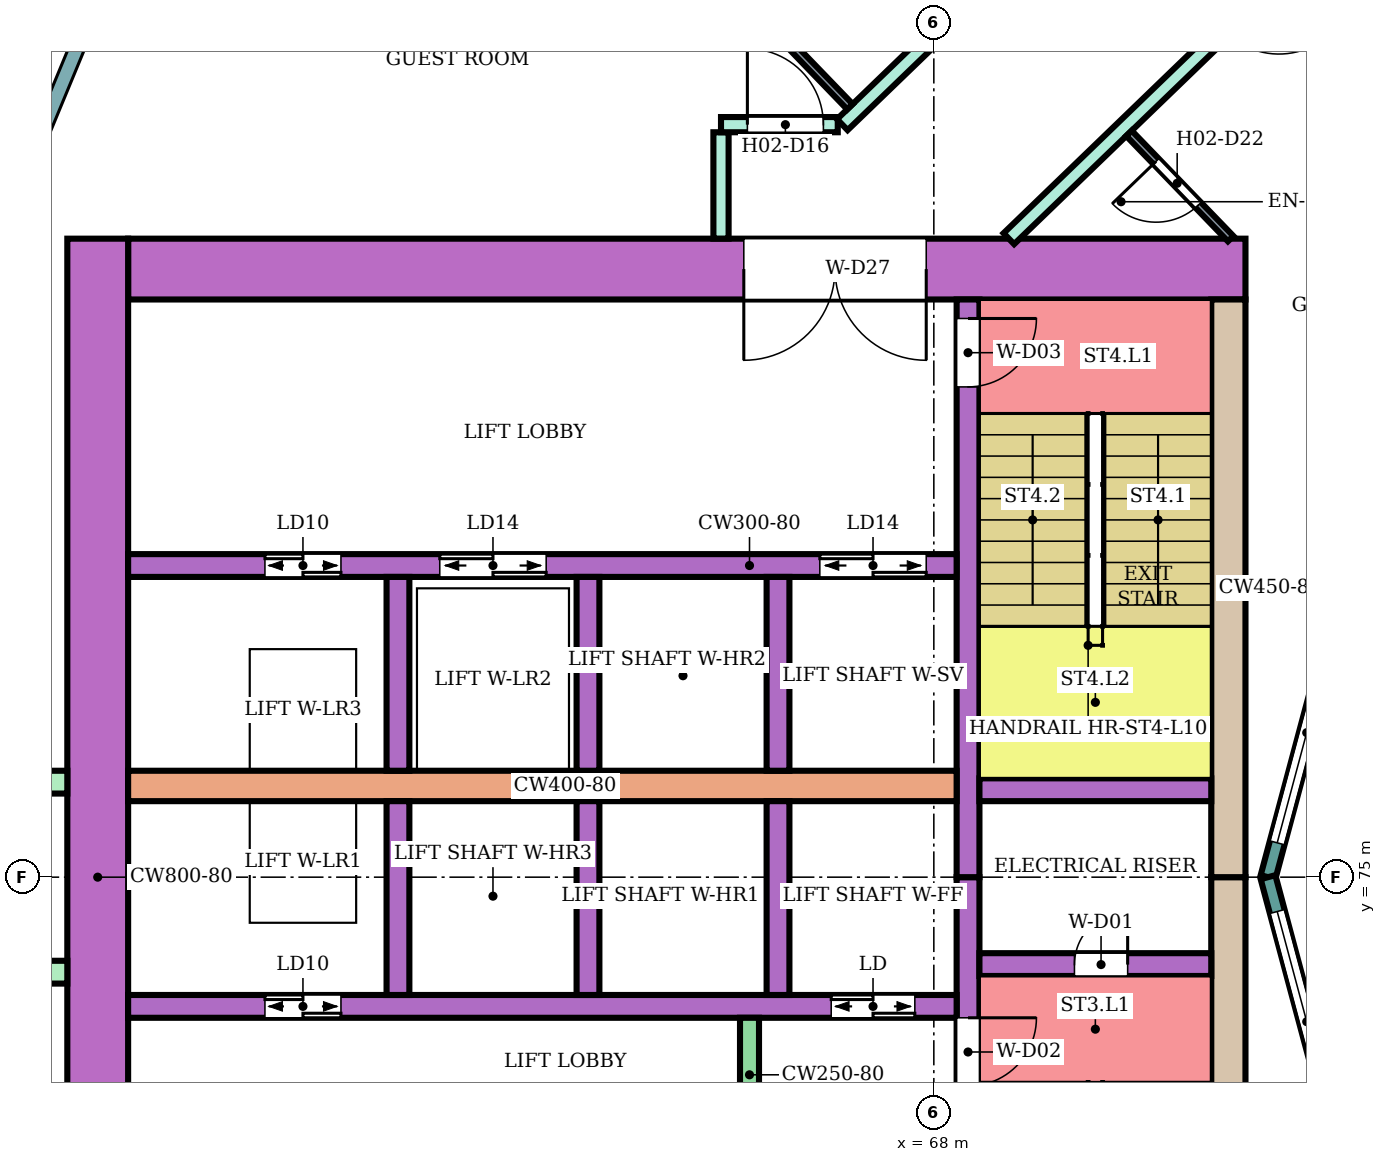
"""IFC4 building model, lengths in metres.
Left out: names, types, materials, properties, quantities, classifications, styles, units other than length and angle.
Written with IfcOpenShell. Run it as: python <this file> out.ifc"""

import sys

from ifc_helpers import new_model, si_unit, direction, frame, frame_2d, origin, place, context, subcontext, project, spatial, rectangle, extrude, element, fill, save


model = new_model("IFC4")
c1 = context("Model", 3, precision=1e-05, world=origin(), true_north=direction((0.0, 1.0)))
c2 = subcontext(c1, "Body", "Model", "MODEL_VIEW")
j1 = project(units=[si_unit("LENGTHUNIT", "METRE"), si_unit("PLANEANGLEUNIT", "RADIAN")], contexts=[c1])
p1 = place(None, origin())
s1 = spatial("IfcSite", under=j1, at=p1, CompositionType="ELEMENT")
p2 = place(p1, origin())
s2 = spatial("IfcBuilding", under=s1, at=p2, CompositionType="ELEMENT")
p3 = place(p2, frame((0.0, 0.0, 47.8)))
s3 = spatial("IfcBuildingStorey", under=s2, at=p3, CompositionType="ELEMENT", Elevation=47.8)
p4 = place(p3, frame((72.1, 83.0, 0.0), z_axis=(0.0, 0.0, 1.0), x_axis=(-1.0, 0.0, 0.0)))
e1 = element("IfcWall", 1, at=p4, inside=s3, PredefinedType="SHEAR", context=c2, shape_type="SweptSolid", body=[
    extrude(rectangle(XDim=14.7, YDim=0.8, at=frame_2d((7.35, 0.0))), origin(), (0.0, 0.0, 1.0), 3.48),
])
p5 = place(p4, frame((4.2, 0.0, 0.0)))
e2 = element("IfcOpeningElement", 2, at=p5, cuts=e1, PredefinedType="OPENING", context=c2, shape_type="SweptSolid", body=[
    extrude(rectangle(XDim=2.4, YDim=2.4, at=frame_2d((1.2, 1.2))), frame((0.0, 0.41, 0.0), z_axis=(0.0, -1.0, 0.0), x_axis=(1.0, 0.0, 0.0)), (0.0, 0.0, 1.0), 0.82),
])
for number, where, z_axis, x_axis in (
    (3, (71.875, 75.0, 0.0), (0.0, 0.0, 1.0), (0.0, -1.0, 0.0)),
    (4, (71.875, 82.6, 0.0), (0.0, 0.0, 1.0), (0.0, -1.0, 0.0)),
):
    element("IfcWall", number, at=place(p3, frame(where, z_axis=z_axis, x_axis=x_axis)), inside=s3, PredefinedType="SHEAR", context=c2, shape_type="SweptSolid", body=[
        extrude(rectangle(XDim=7.6, YDim=0.45, at=frame_2d((3.8, 0.0))), origin(), (0.0, 0.0, 1.0), 3.48),
    ])
p6 = place(p3, frame((57.0, 83.4, 0.0), z_axis=(0.0, 0.0, 1.0), x_axis=(0.0, -1.0, 0.0)))
e5 = element("IfcWall", 5, at=p6, inside=s3, PredefinedType="SHEAR", context=c2, shape_type="SweptSolid", body=[
    extrude(rectangle(XDim=16.8, YDim=0.8, at=frame_2d((8.4, 0.0))), origin(), (0.0, 0.0, 1.0), 3.48),
])
p7 = place(p3, frame((68.45, 75.0, 0.0), z_axis=(0.0, 0.0, 1.0), x_axis=(0.0, -1.0, 0.0)))
e6 = element("IfcWall", 6, at=p7, inside=s3, PredefinedType="SHEAR", context=c2, shape_type="SweptSolid", body=[
    extrude(rectangle(XDim=7.6, YDim=0.3, at=frame_2d((3.8, 0.0))), origin(), (0.0, 0.0, 1.0), 3.48),
])
p8 = place(p7, frame((1.85, 0.0, 0.0)))
e7 = element("IfcOpeningElement", 7, at=p8, cuts=e6, PredefinedType="OPENING", context=c2, shape_type="SweptSolid", body=[
    extrude(rectangle(XDim=0.9, YDim=2.1, at=frame_2d((0.45, 1.05))), frame((0.0, 0.16, 0.0), z_axis=(0.0, -1.0, 0.0), x_axis=(1.0, 0.0, 0.0)), (0.0, 0.0, 1.0), 0.32),
])
p9 = place(p3, frame((68.45, 82.6, 0.0), z_axis=(0.0, 0.0, 1.0), x_axis=(0.0, -1.0, 0.0)))
e8 = element("IfcWall", 8, at=p9, inside=s3, PredefinedType="SHEAR", context=c2, shape_type="SweptSolid", body=[
    extrude(rectangle(XDim=7.6, YDim=0.3, at=frame_2d((3.8, 0.0))), origin(), (0.0, 0.0, 1.0), 3.48),
])
p10 = place(p9, frame((0.25, 0.0, 0.0)))
e9 = element("IfcOpeningElement", 9, at=p10, cuts=e8, PredefinedType="OPENING", context=c2, shape_type="SweptSolid", body=[
    extrude(rectangle(XDim=0.9, YDim=2.1, at=frame_2d((0.45, 1.05))), frame((0.0, 0.16, 0.0), z_axis=(0.0, -1.0, 0.0), x_axis=(1.0, 0.0, 0.0)), (0.0, 0.0, 1.0), 0.32),
])
p11 = place(p3, frame((71.65, 73.85, 0.0), z_axis=(0.0, 0.0, 1.0), x_axis=(-1.0, 0.0, 0.0)))
e10 = element("IfcWall", 10, at=p11, inside=s3, PredefinedType="SHEAR", context=c2, shape_type="SweptSolid", body=[
    extrude(rectangle(XDim=3.05, YDim=0.3, at=frame_2d((1.525, 0.0))), origin(), (0.0, 0.0, 1.0), 3.48),
])
p12 = place(p11, frame((1.1, 0.0, 0.0)))
e11 = element("IfcOpeningElement", 11, at=p12, cuts=e10, PredefinedType="OPENING", context=c2, shape_type="SweptSolid", body=[
    extrude(rectangle(XDim=0.7, YDim=2.0, at=frame_2d((0.35, 1.0))), frame((0.0, 0.16, 0.0), z_axis=(0.0, -1.0, 0.0), x_axis=(1.0, 0.0, 0.0)), (0.0, 0.0, 1.0), 0.32),
])
p13 = place(p3, frame((71.65, 76.15, 0.0), z_axis=(0.0, 0.0, 1.0), x_axis=(-1.0, 0.0, 0.0)))
e12 = element("IfcWall", 12, at=p13, inside=s3, PredefinedType="SHEAR", context=c2, shape_type="SweptSolid", body=[
    extrude(rectangle(XDim=3.05, YDim=0.3, at=frame_2d((1.525, 0.0))), origin(), (0.0, 0.0, 1.0), 3.48),
])
p14 = place(p3, frame((68.3, 73.3, 0.0), z_axis=(0.0, 0.0, 1.0), x_axis=(-1.0, 0.0, 0.0)))
e13 = element("IfcWall", 13, at=p14, inside=s3, PredefinedType="SHEAR", context=c2, shape_type="SweptSolid", body=[
    extrude(rectangle(XDim=10.9, YDim=0.3, at=frame_2d((5.45, 0.0))), origin(), (0.0, 0.0, 1.0), 3.48),
])
p15 = place(p14, frame((0.55, 0.0, 0.0)))
e14 = element("IfcOpeningElement", 14, at=p15, cuts=e13, PredefinedType="OPENING", context=c2, shape_type="SweptSolid", body=[
    extrude(rectangle(XDim=1.1, YDim=2.1, at=frame_2d((0.55, 1.05))), frame((0.0, 0.16, 0.0), z_axis=(0.0, -1.0, 0.0), x_axis=(1.0, 0.0, 0.0)), (0.0, 0.0, 1.0), 0.32),
])
p16 = place(p14, frame((8.1, 0.0, 0.0)))
e15 = element("IfcOpeningElement", 15, at=p16, cuts=e13, PredefinedType="OPENING", context=c2, shape_type="SweptSolid", body=[
    extrude(rectangle(XDim=1.0, YDim=2.1, at=frame_2d((0.5, 1.05))), frame((0.0, 0.16, 0.0), z_axis=(0.0, -1.0, 0.0), x_axis=(1.0, 0.0, 0.0)), (0.0, 0.0, 1.0), 0.32),
])
p17 = place(p3, frame((68.3, 76.2, 0.0), z_axis=(0.0, 0.0, 1.0), x_axis=(-1.0, 0.0, 0.0)))
e16 = element("IfcWall", 16, at=p17, inside=s3, PredefinedType="SHEAR", context=c2, shape_type="SweptSolid", body=[
    extrude(rectangle(XDim=10.9, YDim=0.4, at=frame_2d((5.45, 0.0))), origin(), (0.0, 0.0, 1.0), 3.48),
])
p18 = place(p3, frame((68.3, 79.1, 0.0), z_axis=(0.0, 0.0, 1.0), x_axis=(-1.0, 0.0, 0.0)))
e17 = element("IfcWall", 17, at=p18, inside=s3, PredefinedType="SHEAR", context=c2, shape_type="SweptSolid", body=[
    extrude(rectangle(XDim=10.9, YDim=0.3, at=frame_2d((5.45, 0.0))), origin(), (0.0, 0.0, 1.0), 3.48),
])
p19 = place(p18, frame((0.4, 0.0, 0.0)))
e18 = element("IfcOpeningElement", 18, at=p19, cuts=e17, PredefinedType="OPENING", context=c2, shape_type="SweptSolid", body=[
    extrude(rectangle(XDim=1.4, YDim=2.1, at=frame_2d((0.7, 1.05))), frame((0.0, 0.16, 0.0), z_axis=(0.0, -1.0, 0.0), x_axis=(1.0, 0.0, 0.0)), (0.0, 0.0, 1.0), 0.32),
])
p20 = place(p18, frame((5.4, 0.0, 0.0)))
e19 = element("IfcOpeningElement", 19, at=p20, cuts=e17, PredefinedType="OPENING", context=c2, shape_type="SweptSolid", body=[
    extrude(rectangle(XDim=1.4, YDim=2.1, at=frame_2d((0.7, 1.05))), frame((0.0, 0.16, 0.0), z_axis=(0.0, -1.0, 0.0), x_axis=(1.0, 0.0, 0.0)), (0.0, 0.0, 1.0), 0.32),
])
p21 = place(p18, frame((8.1, 0.0, 0.0)))
e20 = element("IfcOpeningElement", 20, at=p21, cuts=e17, PredefinedType="OPENING", context=c2, shape_type="SweptSolid", body=[
    extrude(rectangle(XDim=1.0, YDim=2.1, at=frame_2d((0.5, 1.05))), frame((0.0, 0.16, 0.0), z_axis=(0.0, -1.0, 0.0), x_axis=(1.0, 0.0, 0.0)), (0.0, 0.0, 1.0), 0.32),
])
for number, where, z_axis, x_axis in (
    (21, (65.95, 76.0, 0.0), (0.0, 0.0, 1.0), (0.0, -1.0, 0.0)),
    (22, (63.45, 76.0, 0.0), (0.0, 0.0, 1.0), (0.0, -1.0, 0.0)),
    (23, (60.95, 76.0, 0.0), (0.0, 0.0, 1.0), (0.0, -1.0, 0.0)),
    (24, (65.95, 78.95, 0.0), (0.0, 0.0, 1.0), (0.0, -1.0, 0.0)),
    (25, (63.45, 78.95, 0.0), (0.0, 0.0, 1.0), (0.0, -1.0, 0.0)),
    (26, (60.95, 78.95, 0.0), (0.0, 0.0, 1.0), (0.0, -1.0, 0.0)),
):
    element("IfcWall", number, at=place(p3, frame(where, z_axis=z_axis, x_axis=x_axis)), inside=s3, PredefinedType="SHEAR", context=c2, shape_type="SweptSolid", body=[
        extrude(rectangle(XDim=2.55, YDim=0.3, at=frame_2d((1.275, 0.0))), origin(), (0.0, 0.0, 1.0), 3.48),
    ])
p22 = place(p3, frame((65.575, 73.15, 0.0), z_axis=(0.0, 0.0, 1.0), x_axis=(0.0, -1.0, 0.0)))
e27 = element("IfcWall", 27, at=p22, inside=s3, PredefinedType="SHEAR", context=c2, shape_type="SweptSolid", body=[
    extrude(rectangle(XDim=1.5, YDim=0.25, at=frame_2d((0.75, 0.0))), origin(), (0.0, 0.0, 1.0), 3.48),
])
for number, where, z_axis, x_axis in (
    (28, (56.6, 76.25, 0.0), (0.0, 0.0, 1.0), (-1.0, 0.0, 0.0)),
    (29, (56.6, 73.75, 0.0), (0.0, 0.0, 1.0), (-1.0, 0.0, 0.0)),
):
    element("IfcWall", number, at=place(p3, frame(where, z_axis=z_axis, x_axis=x_axis)), inside=s3, PredefinedType="NOTDEFINED", context=c2, shape_type="SweptSolid", body=[
        extrude(rectangle(XDim=2.416, YDim=0.3, at=frame_2d((1.208, 0.0))), origin(), (0.0, 0.0, 1.0), 3.8),
    ])
p23 = place(p3, frame((73.415, 78.802, 0.0), z_axis=(0.0, 0.0, 1.0), x_axis=(-0.258789828301, -0.965933654434, 0.0)))
e30 = element("IfcWall", 30, at=p23, inside=s3, PredefinedType="NOTDEFINED", context=c2, shape_type="SweptSolid", body=[
    extrude(rectangle(XDim=3.936, YDim=0.2, at=frame_2d((1.968, 0.0))), origin(), (0.0, 0.0, 1.0), 3.8),
])
p24 = place(p23, frame((0.468, 0.0, 0.9)))
e31 = element("IfcOpeningElement", 31, at=p24, cuts=e30, PredefinedType="OPENING", context=c2, shape_type="SweptSolid", body=[
    extrude(rectangle(XDim=3.0, YDim=2.3, at=frame_2d((1.5, 1.15))), frame((0.0, 0.11, 0.0), z_axis=(0.0, -1.0, 0.0), x_axis=(1.0, 0.0, 0.0)), (0.0, 0.0, 1.0), 0.22),
])
p25 = place(p3, frame((72.396, 75.0, 0.0), z_axis=(0.0, 0.0, 1.0), x_axis=(0.258789828301, -0.965933654434, 0.0)))
e32 = element("IfcWall", 32, at=p25, inside=s3, PredefinedType="NOTDEFINED", context=c2, shape_type="SweptSolid", body=[
    extrude(rectangle(XDim=3.936, YDim=0.2, at=frame_2d((1.968, 0.0))), origin(), (0.0, 0.0, 1.0), 3.8),
])
p26 = place(p25, frame((0.468, 0.0, 0.9)))
e33 = element("IfcOpeningElement", 33, at=p26, cuts=e32, PredefinedType="OPENING", context=c2, shape_type="SweptSolid", body=[
    extrude(rectangle(XDim=3.0, YDim=2.3, at=frame_2d((1.5, 1.15))), frame((0.0, 0.11, 0.0), z_axis=(0.0, -1.0, 0.0), x_axis=(1.0, 0.0, 0.0)), (0.0, 0.0, 1.0), 0.22),
])
p27 = place(p3, frame((65.2, 83.401, 0.0), z_axis=(0.0, 0.0, 1.0), x_axis=(0.0, 1.0, 0.0)))
e34 = element("IfcWall", 34, at=p27, inside=s3, PredefinedType="PARTITIONING", context=c2, shape_type="SweptSolid", body=[
    extrude(rectangle(XDim=1.399, YDim=0.2, at=frame_2d((0.7, 0.0))), origin(), (0.0, 0.0, 1.0), 3.35),
])
p28 = place(p3, frame((65.2, 84.9, 0.0), z_axis=(0.0, 0.0, 1.0), x_axis=(1.0, 0.0, 0.0)))
e35 = element("IfcWall", 35, at=p28, inside=s3, PredefinedType="PARTITIONING", context=c2, shape_type="SweptSolid", body=[
    extrude(rectangle(XDim=1.536, YDim=0.2, at=frame_2d((0.768, 0.0))), origin(), (0.0, 0.0, 1.0), 3.35),
])
p29 = place(p28, frame((0.347, 0.0, 0.0)))
e36 = element("IfcOpeningElement", 36, at=p29, cuts=e35, PredefinedType="OPENING", context=c2, shape_type="SweptSolid", body=[
    extrude(rectangle(XDim=1.0, YDim=2.1, at=frame_2d((0.5, 1.05))), frame((0.0, 0.11, 0.0), z_axis=(0.0, -1.0, 0.0), x_axis=(1.0, 0.0, 0.0)), (0.0, 0.0, 1.0), 0.22),
])
p30 = place(p3, frame((66.796, 84.9, 0.0), z_axis=(0.0, 0.0, 1.0), x_axis=(0.719690131178, 0.694295409092, 0.0)))
e37 = element("IfcWall", 37, at=p30, inside=s3, PredefinedType="PARTITIONING", context=c2, shape_type="SweptSolid", body=[
    extrude(rectangle(XDim=6.585, YDim=0.2, at=frame_2d((3.293, 0.0))), origin(), (0.0, 0.0, 1.0), 3.35),
])
p31 = place(p30, frame((2.867, 0.0, 0.0)))
e38 = element("IfcOpeningElement", 38, at=p31, cuts=e37, PredefinedType="OPENING", context=c2, shape_type="SweptSolid", body=[
    extrude(rectangle(XDim=1.0, YDim=2.1, at=frame_2d((0.5, 1.05))), frame((0.0, 0.11, 0.0), z_axis=(0.0, -1.0, 0.0), x_axis=(1.0, 0.0, 0.0)), (0.0, 0.0, 1.0), 0.22),
])
p32 = place(p3, frame((68.987, 83.4, 0.0), z_axis=(0.0, 0.0, 1.0), x_axis=(0.719591503389, 0.694397629784, 0.0)))
e39 = element("IfcWall", 39, at=p32, inside=s3, PredefinedType="PARTITIONING", context=c2, shape_type="SweptSolid", body=[
    extrude(rectangle(XDim=5.378, YDim=0.2, at=frame_2d((2.689, 0.0))), origin(), (0.0, 0.0, 1.0), 3.35),
])
p33 = place(p32, frame((3.938, 0.0, 0.0)))
e40 = element("IfcOpeningElement", 40, at=p33, cuts=e39, PredefinedType="OPENING", context=c2, shape_type="SweptSolid", body=[
    extrude(rectangle(XDim=1.0, YDim=2.1, at=frame_2d((0.5, 1.05))), frame((0.0, 0.11, 0.0), z_axis=(0.0, -1.0, 0.0), x_axis=(1.0, 0.0, 0.0)), (0.0, 0.0, 1.0), 0.22),
])
p34 = place(p3, frame((72.949, 87.215, 0.0), z_axis=(0.0, 0.0, 1.0), x_axis=(0.499890755261, -0.866088467077, 0.0)))
e41 = element("IfcWall", 41, at=p34, inside=s3, PredefinedType="PARTITIONING", context=c2, shape_type="SweptSolid", body=[
    extrude(rectangle(XDim=6.404, YDim=0.2, at=frame_2d((3.202, 0.0))), origin(), (0.0, 0.0, 1.0), 3.35),
])
p35 = place(p3, frame((65.022, 87.079, 0.0), z_axis=(0.0, 0.0, 1.0), x_axis=(0.694287838235, -0.719697434815, 0.0)))
e42 = element("IfcWall", 42, at=p35, inside=s3, PredefinedType="PARTITIONING", context=c2, shape_type="SweptSolid", body=[
    extrude(rectangle(XDim=2.7, YDim=0.1, at=frame_2d((1.35, 0.0))), origin(), (0.0, 0.0, 1.0), 3.35),
])
p36 = place(p35, frame((0.85, 0.0, 0.0)))
e43 = element("IfcOpeningElement", 43, at=p36, cuts=e42, PredefinedType="OPENING", context=c2, shape_type="SweptSolid", body=[
    extrude(rectangle(XDim=0.8, YDim=2.1, at=frame_2d((0.4, 1.05))), frame((0.0, 0.06, 0.0), z_axis=(0.0, -1.0, 0.0), x_axis=(1.0, 0.0, 0.0)), (0.0, 0.0, 1.0), 0.12),
])
p37 = place(p3, frame((70.567, 84.786, 0.0), z_axis=(0.0, 0.0, 1.0), x_axis=(0.694447472534, -0.719543402368, 0.0)))
e44 = element("IfcWall", 44, at=p37, inside=s3, PredefinedType="PARTITIONING", context=c2, shape_type="SweptSolid", body=[
    extrude(rectangle(XDim=1.926, YDim=0.1, at=frame_2d((0.963, 0.0))), origin(), (0.0, 0.0, 1.0), 3.35),
])
p38 = place(p37, frame((0.513, 0.0, 0.0)))
e45 = element("IfcOpeningElement", 45, at=p38, cuts=e44, PredefinedType="OPENING", context=c2, shape_type="SweptSolid", body=[
    extrude(rectangle(XDim=0.8, YDim=2.1, at=frame_2d((0.4, 1.05))), frame((0.0, 0.06, 0.0), z_axis=(0.0, -1.0, 0.0), x_axis=(1.0, 0.0, 0.0)), (0.0, 0.0, 1.0), 0.12),
])
p39 = place(p24, origin())
e46 = element("IfcWindow", 46, at=p39, inside=s3, PartitioningType="SINGLE_PANEL", PredefinedType="WINDOW", context=c2, shape_type="SweptSolid", body=[
    extrude(rectangle(XDim=3.0, YDim=2.3, at=frame_2d((1.5, 1.15))), frame((0.0, 0.03, 0.0), z_axis=(0.0, -1.0, 0.0), x_axis=(1.0, 0.0, 0.0)), (0.0, 0.0, 1.0), 0.06),
])
fill(e31, e46)
p40 = place(p26, origin())
e47 = element("IfcWindow", 47, at=p40, inside=s3, PartitioningType="SINGLE_PANEL", PredefinedType="WINDOW", context=c2, shape_type="SweptSolid", body=[
    extrude(rectangle(XDim=3.0, YDim=2.3, at=frame_2d((1.5, 1.15))), frame((0.0, 0.03, 0.0), z_axis=(0.0, -1.0, 0.0), x_axis=(1.0, 0.0, 0.0)), (0.0, 0.0, 1.0), 0.06),
])
fill(e33, e47)
p41 = place(p29, origin())
e48 = element("IfcDoor", 48, at=p41, inside=s3, OperationType="SINGLE_SWING_LEFT", PredefinedType="DOOR", context=c2, shape_type="SweptSolid", body=[
    extrude(rectangle(XDim=1.0, YDim=2.1, at=frame_2d((0.5, 1.05))), frame((0.0, 0.025, 0.0), z_axis=(0.0, -1.0, 0.0), x_axis=(1.0, 0.0, 0.0)), (0.0, 0.0, 1.0), 0.05),
])
fill(e36, e48)
p42 = place(p38, frame((0.8, 0.0, 0.0), z_axis=(0.0, 0.0, 1.0), x_axis=(-1.0, 0.0, 0.0)))
e49 = element("IfcDoor", 49, at=p42, inside=s3, OperationType="SINGLE_SWING_RIGHT", PredefinedType="DOOR", context=c2, shape_type="SweptSolid", body=[
    extrude(rectangle(XDim=0.8, YDim=2.1, at=frame_2d((0.4, 1.05))), frame((0.0, 0.025, 0.0), z_axis=(0.0, -1.0, 0.0), x_axis=(1.0, 0.0, 0.0)), (0.0, 0.0, 1.0), 0.05),
])
fill(e45, e49)
p43 = place(p12, frame((0.7, 0.0, 0.0), z_axis=(0.0, 0.0, 1.0), x_axis=(-1.0, 0.0, 0.0)))
e50 = element("IfcDoor", 50, at=p43, inside=s3, OperationType="SINGLE_SWING_RIGHT", PredefinedType="DOOR", context=c2, shape_type="SweptSolid", body=[
    extrude(rectangle(XDim=0.7, YDim=2.0, at=frame_2d((0.35, 1.0))), frame((0.0, 0.025, 0.0), z_axis=(0.0, -1.0, 0.0), x_axis=(1.0, 0.0, 0.0)), (0.0, 0.0, 1.0), 0.05),
])
fill(e11, e50)
p44 = place(p8, origin())
e51 = element("IfcDoor", 51, at=p44, inside=s3, OperationType="SINGLE_SWING_LEFT", PredefinedType="DOOR", context=c2, shape_type="SweptSolid", body=[
    extrude(rectangle(XDim=0.9, YDim=2.1, at=frame_2d((0.45, 1.05))), frame((0.0, 0.025, 0.0), z_axis=(0.0, -1.0, 0.0), x_axis=(1.0, 0.0, 0.0)), (0.0, 0.0, 1.0), 0.05),
])
fill(e7, e51)
p45 = place(p10, origin())
e52 = element("IfcDoor", 52, at=p45, inside=s3, OperationType="SINGLE_SWING_LEFT", PredefinedType="DOOR", context=c2, shape_type="SweptSolid", body=[
    extrude(rectangle(XDim=0.9, YDim=2.1, at=frame_2d((0.45, 1.05))), frame((0.0, 0.025, 0.0), z_axis=(0.0, -1.0, 0.0), x_axis=(1.0, 0.0, 0.0)), (0.0, 0.0, 1.0), 0.05),
])
fill(e9, e52)
p46 = place(p15, origin())
e53 = element("IfcDoor", 53, at=p46, inside=s3, OperationType="DOUBLE_DOOR_SLIDING", PredefinedType="DOOR", context=c2, shape_type="SweptSolid", body=[
    extrude(rectangle(XDim=1.1, YDim=2.1, at=frame_2d((0.55, 1.05))), frame((0.0, 0.025, 0.0), z_axis=(0.0, -1.0, 0.0), x_axis=(1.0, 0.0, 0.0)), (0.0, 0.0, 1.0), 0.05),
])
fill(e14, e53)
p47 = place(p16, origin())
e54 = element("IfcDoor", 54, at=p47, inside=s3, OperationType="DOUBLE_DOOR_SLIDING", PredefinedType="DOOR", context=c2, shape_type="SweptSolid", body=[
    extrude(rectangle(XDim=1.0, YDim=2.1, at=frame_2d((0.5, 1.05))), frame((0.0, 0.025, 0.0), z_axis=(0.0, -1.0, 0.0), x_axis=(1.0, 0.0, 0.0)), (0.0, 0.0, 1.0), 0.05),
])
fill(e15, e54)
p48 = place(p19, origin())
e55 = element("IfcDoor", 55, at=p48, inside=s3, OperationType="DOUBLE_DOOR_SLIDING", PredefinedType="DOOR", context=c2, shape_type="SweptSolid", body=[
    extrude(rectangle(XDim=1.4, YDim=2.1, at=frame_2d((0.7, 1.05))), frame((0.0, 0.025, 0.0), z_axis=(0.0, -1.0, 0.0), x_axis=(1.0, 0.0, 0.0)), (0.0, 0.0, 1.0), 0.05),
])
fill(e18, e55)
p49 = place(p20, origin())
e56 = element("IfcDoor", 56, at=p49, inside=s3, OperationType="DOUBLE_DOOR_SLIDING", PredefinedType="DOOR", context=c2, shape_type="SweptSolid", body=[
    extrude(rectangle(XDim=1.4, YDim=2.1, at=frame_2d((0.7, 1.05))), frame((0.0, 0.025, 0.0), z_axis=(0.0, -1.0, 0.0), x_axis=(1.0, 0.0, 0.0)), (0.0, 0.0, 1.0), 0.05),
])
fill(e19, e56)
p50 = place(p21, origin())
e57 = element("IfcDoor", 57, at=p50, inside=s3, OperationType="DOUBLE_DOOR_SLIDING", PredefinedType="DOOR", context=c2, shape_type="SweptSolid", body=[
    extrude(rectangle(XDim=1.0, YDim=2.1, at=frame_2d((0.5, 1.05))), frame((0.0, 0.025, 0.0), z_axis=(0.0, -1.0, 0.0), x_axis=(1.0, 0.0, 0.0)), (0.0, 0.0, 1.0), 0.05),
])
fill(e20, e57)
p51 = place(p5, origin())
e58 = element("IfcDoor", 58, at=p51, inside=s3, OperationType="DOUBLE_DOOR_SINGLE_SWING", PredefinedType="DOOR", context=c2, shape_type="SweptSolid", body=[
    extrude(rectangle(XDim=2.4, YDim=2.4, at=frame_2d((1.2, 1.2))), frame((0.0, 0.025, 0.0), z_axis=(0.0, -1.0, 0.0), x_axis=(1.0, 0.0, 0.0)), (0.0, 0.0, 1.0), 0.05),
])
fill(e2, e58)
save(model, sys.argv[1])
